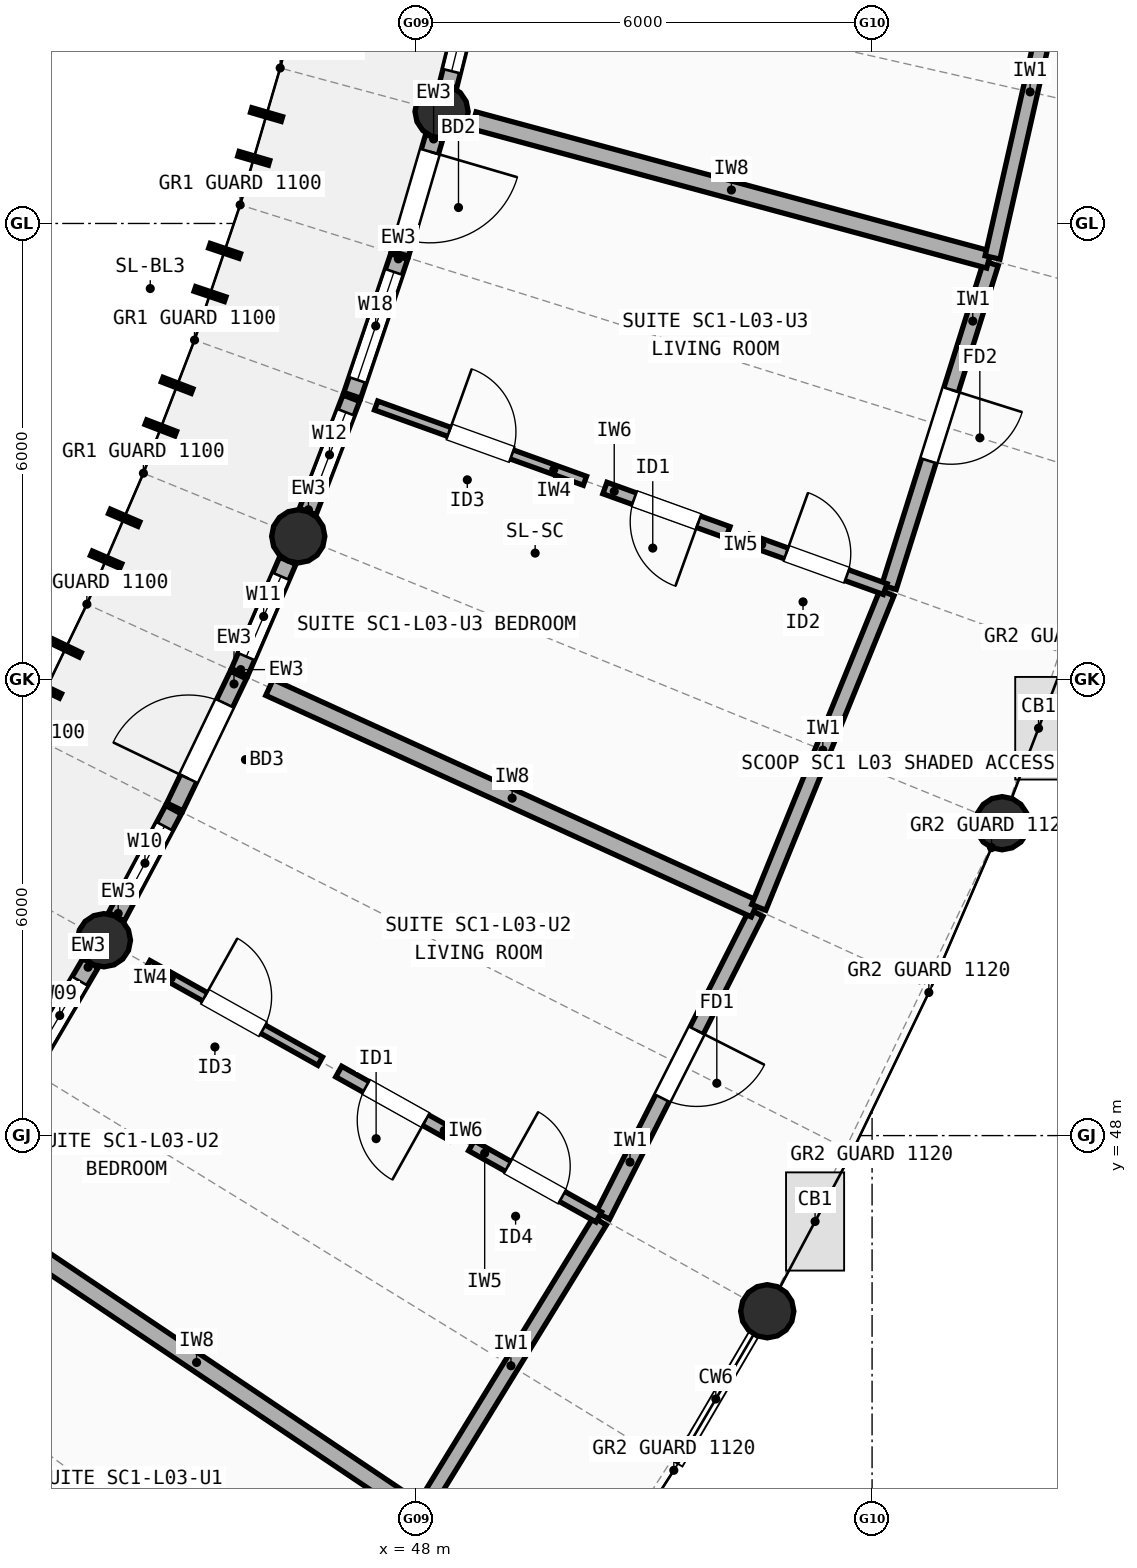
"""IFC4 building model, lengths in metres.
Left out: names, types, materials, properties, quantities, classifications, styles, units other than length and angle.
Written with IfcOpenShell. Run it as: python <this file> out.ifc"""

import sys

from ifc_helpers import new_model, si_unit, direction, frame, frame_2d, origin, origin_2d, place, context, subcontext, project, spatial, rectangle, circle, extrude, element, fill, save


model = new_model("IFC4")
c1 = context("Model", 3, precision=1e-05, world=origin(), true_north=direction((0.0, 1.0)))
c2 = subcontext(c1, "Body", "Model", "MODEL_VIEW")
j1 = project(units=[si_unit("LENGTHUNIT", "METRE"), si_unit("PLANEANGLEUNIT", "RADIAN")], contexts=[c1])
p1 = place(None, origin())
s1 = spatial("IfcSite", under=j1, at=p1, CompositionType="ELEMENT")
p2 = place(p1, origin())
s2 = spatial("IfcBuilding", under=s1, at=p2, CompositionType="ELEMENT")
p3 = place(p2, frame((0.0, 0.0, 10.9)))
s3 = spatial("IfcBuildingStorey", under=s2, at=p3, CompositionType="ELEMENT", Elevation=10.9)
for number, where, z_axis, x_axis in (
    (1, (43.893, 50.57, 0.0), (0.0, 0.0, 1.0), (1.0, 0.0, 0.0)),
    (2, (52.621, 45.689, 0.0), (0.0, 0.0, 1.0), (1.0, 0.0, 0.0)),
    (3, (46.45, 55.884, 0.0), (0.0, 0.0, 1.0), (1.0, 0.0, 0.0)),
    (4, (55.71, 52.11, 0.0), (0.0, 0.0, 1.0), (1.0, 0.0, 0.0)),
    (5, (48.336, 61.471, 0.0), (0.0, 0.0, 1.0), (1.0, 0.0, 0.0)),
):
    element("IfcColumn", number, at=place(p3, frame(where, z_axis=z_axis, x_axis=x_axis)), inside=s3, PredefinedType="COLUMN", context=c2, shape_type="SweptSolid", body=[
        extrude(circle(Radius=0.35, at=origin_2d()), origin(), (0.0, 0.0, 1.0), 2.948),
    ])
p4 = place(p3, frame((42.908, 48.891, 0.0), z_axis=(0.0, 0.0, 1.0), x_axis=(0.505970625323, 0.862550709414, 0.0)))
e6 = element("IfcWall", 6, at=p4, inside=s3, PredefinedType="STANDARD", context=c2, shape_type="SweptSolid", body=[
    extrude(rectangle(XDim=1.597, YDim=0.235, at=frame_2d((0.798, 0.0))), origin(), (0.0, 0.0, 1.0), 2.684),
])
p5 = place(p4, frame((0.273, 0.0, 0.85)))
e7 = element("IfcOpeningElement", 7, at=p5, cuts=e6, PredefinedType="OPENING", context=c2, shape_type="SweptSolid", body=[
    extrude(rectangle(XDim=1.05, YDim=1.35, at=frame_2d((0.525, 0.675))), frame((0.0, 0.127, 0.0), z_axis=(0.0, -1.0, 0.0), x_axis=(1.0, 0.0, 0.0)), (0.0, 0.0, 1.0), 0.255),
])
p6 = place(p3, frame((44.058, 50.879, 0.0), z_axis=(0.0, 0.0, 1.0), x_axis=(0.470183436771, 0.882568714484, 0.0)))
e8 = element("IfcWall", 8, at=p6, inside=s3, PredefinedType="STANDARD", context=c2, shape_type="SweptSolid", body=[
    extrude(rectangle(XDim=1.597, YDim=0.235, at=frame_2d((0.798, 0.0))), origin(), (0.0, 0.0, 1.0), 2.684),
])
p7 = place(p6, frame((0.248, 0.0, 0.85)))
e9 = element("IfcOpeningElement", 9, at=p7, cuts=e8, PredefinedType="OPENING", context=c2, shape_type="SweptSolid", body=[
    extrude(rectangle(XDim=1.1, YDim=1.45, at=frame_2d((0.55, 0.725))), frame((0.0, 0.127, 0.0), z_axis=(0.0, -1.0, 0.0), x_axis=(1.0, 0.0, 0.0)), (0.0, 0.0, 1.0), 0.255),
])
p8 = place(p3, frame((44.826, 52.324, 0.0), z_axis=(0.0, 0.0, 1.0), x_axis=(0.433579410465, 0.90111536155, 0.0)))
e10 = element("IfcWall", 10, at=p8, inside=s3, PredefinedType="STANDARD", context=c2, shape_type="SweptSolid", body=[
    extrude(rectangle(XDim=1.927, YDim=0.235, at=frame_2d((0.963, 0.0))), origin(), (0.0, 0.0, 1.0), 2.684),
])
p9 = place(p8, frame((0.413, 0.0, 0.0)))
e11 = element("IfcOpeningElement", 11, at=p9, cuts=e10, PredefinedType="OPENING", context=c2, shape_type="SweptSolid", body=[
    extrude(rectangle(XDim=1.1, YDim=2.15, at=frame_2d((0.55, 1.075))), frame((0.0, 0.127, 0.0), z_axis=(0.0, -1.0, 0.0), x_axis=(1.0, 0.0, 0.0)), (0.0, 0.0, 1.0), 0.255),
])
p10 = place(p3, frame((45.678, 54.097, 0.0), z_axis=(0.0, 0.0, 1.0), x_axis=(0.396353998836, 0.918097765822, 0.0)))
e12 = element("IfcWall", 12, at=p10, inside=s3, PredefinedType="STANDARD", context=c2, shape_type="SweptSolid", body=[
    extrude(rectangle(XDim=1.597, YDim=0.235, at=frame_2d((0.798, 0.0))), origin(), (0.0, 0.0, 1.0), 2.684),
])
p11 = place(p10, frame((0.223, 0.0, 0.85)))
e13 = element("IfcOpeningElement", 13, at=p11, cuts=e12, PredefinedType="OPENING", context=c2, shape_type="SweptSolid", body=[
    extrude(rectangle(XDim=1.15, YDim=1.45, at=frame_2d((0.575, 0.725))), frame((0.0, 0.127, 0.0), z_axis=(0.0, -1.0, 0.0), x_axis=(1.0, 0.0, 0.0)), (0.0, 0.0, 1.0), 0.255),
])
p12 = place(p3, frame((46.575, 56.211, 0.0), z_axis=(0.0, 0.0, 1.0), x_axis=(0.358384767005, 0.933573970705, 0.0)))
e14 = element("IfcWall", 14, at=p12, inside=s3, PredefinedType="STANDARD", context=c2, shape_type="SweptSolid", body=[
    extrude(rectangle(XDim=1.597, YDim=0.235, at=frame_2d((0.798, 0.0))), origin(), (0.0, 0.0, 1.0), 2.684),
])
p13 = place(p12, frame((0.198, 0.0, 0.85)))
e15 = element("IfcOpeningElement", 15, at=p13, cuts=e14, PredefinedType="OPENING", context=c2, shape_type="SweptSolid", body=[
    extrude(rectangle(XDim=1.2, YDim=1.35, at=frame_2d((0.6, 0.675))), frame((0.0, 0.127, 0.0), z_axis=(0.0, -1.0, 0.0), x_axis=(1.0, 0.0, 0.0)), (0.0, 0.0, 1.0), 0.255),
])
p14 = place(p3, frame((47.161, 57.739, 0.0), z_axis=(0.0, 0.0, 1.0), x_axis=(0.319798549746, 0.947485560618, 0.0)))
e16 = element("IfcWall", 16, at=p14, inside=s3, PredefinedType="STANDARD", context=c2, shape_type="SweptSolid", body=[
    extrude(rectangle(XDim=1.927, YDim=0.235, at=frame_2d((0.963, 0.0))), origin(), (0.0, 0.0, 1.0), 2.684),
])
p15 = place(p14, frame((0.213, 0.0, 0.85)))
e17 = element("IfcOpeningElement", 17, at=p15, cuts=e16, PredefinedType="OPENING", context=c2, shape_type="SweptSolid", body=[
    extrude(rectangle(XDim=1.5, YDim=1.4, at=frame_2d((0.75, 0.7))), frame((0.0, 0.127, 0.0), z_axis=(0.0, -1.0, 0.0), x_axis=(1.0, 0.0, 0.0)), (0.0, 0.0, 1.0), 0.255),
])
p16 = place(p3, frame((47.79, 59.603, 0.0), z_axis=(0.0, 0.0, 1.0), x_axis=(0.28073386291, 0.959785652224, 0.0)))
e18 = element("IfcWall", 18, at=p16, inside=s3, PredefinedType="STANDARD", context=c2, shape_type="SweptSolid", body=[
    extrude(rectangle(XDim=1.597, YDim=0.235, at=frame_2d((0.798, 0.0))), origin(), (0.0, 0.0, 1.0), 2.684),
])
p17 = place(p16, frame((0.198, 0.0, 0.0)))
e19 = element("IfcOpeningElement", 19, at=p17, cuts=e18, PredefinedType="OPENING", context=c2, shape_type="SweptSolid", body=[
    extrude(rectangle(XDim=1.2, YDim=2.15, at=frame_2d((0.6, 1.075))), frame((0.0, 0.127, 0.0), z_axis=(0.0, -1.0, 0.0), x_axis=(1.0, 0.0, 0.0)), (0.0, 0.0, 1.0), 0.255),
])
p18 = place(p3, frame((48.42, 61.811, 0.0), z_axis=(0.0, 0.0, 1.0), x_axis=(0.241240447943, 0.970465376135, 0.0)))
e20 = element("IfcWall", 20, at=p18, inside=s3, PredefinedType="STANDARD", context=c2, shape_type="SweptSolid", body=[
    extrude(rectangle(XDim=1.597, YDim=0.235, at=frame_2d((0.798, 0.0))), origin(), (0.0, 0.0, 1.0), 2.684),
])
p19 = place(p18, frame((0.198, 0.0, 0.85)))
e21 = element("IfcOpeningElement", 21, at=p19, cuts=e20, PredefinedType="OPENING", context=c2, shape_type="SweptSolid", body=[
    extrude(rectangle(XDim=1.2, YDim=1.5, at=frame_2d((0.6, 0.75))), frame((0.0, 0.127, 0.0), z_axis=(0.0, -1.0, 0.0), x_axis=(1.0, 0.0, 0.0)), (0.0, 0.0, 1.0), 0.255),
])
p20 = place(p3, frame((42.2, 46.974, 0.0), z_axis=(0.0, 0.0, 1.0), x_axis=(0.82987699708, -0.55794638606, 0.0)))
e22 = element("IfcWall", 22, at=p20, inside=s3, PredefinedType="SOLIDWALL", context=c2, shape_type="SweptSolid", body=[
    extrude(rectangle(XDim=7.02, YDim=0.23, at=frame_2d((3.51, 0.0))), origin(), (0.0, 0.0, 1.0), 2.722),
])
p21 = place(p3, frame((48.08, 43.069, 0.0), z_axis=(0.0, 0.0, 1.0), x_axis=(0.523444746739, 0.852059620632, 0.0)))
e23 = element("IfcWall", 23, at=p21, inside=s3, PredefinedType="SOLIDWALL", context=c2, shape_type="SweptSolid", body=[
    extrude(rectangle(XDim=4.467, YDim=0.2, at=frame_2d((2.234, 0.0))), origin(), (0.0, 0.0, 1.0), 2.742),
])
p22 = place(p3, frame((50.457, 46.945, 0.0), z_axis=(0.0, 0.0, 1.0), x_axis=(0.451972910967, 0.892031662976, 0.0)))
e24 = element("IfcWall", 24, at=p22, inside=s3, PredefinedType="SOLIDWALL", context=c2, shape_type="SweptSolid", body=[
    extrude(rectangle(XDim=4.467, YDim=0.2, at=frame_2d((2.234, 0.0))), origin(), (0.0, 0.0, 1.0), 2.722),
])
p23 = place(p22, frame((1.734, 0.0, 0.0)))
e25 = element("IfcOpeningElement", 25, at=p23, cuts=e24, PredefinedType="OPENING", context=c2, shape_type="SweptSolid", body=[
    extrude(rectangle(XDim=1.0, YDim=2.15, at=frame_2d((0.5, 1.075))), frame((0.0, 0.11, 0.0), z_axis=(0.0, -1.0, 0.0), x_axis=(1.0, 0.0, 0.0)), (0.0, 0.0, 1.0), 0.22),
])
p24 = place(p3, frame((44.469, 50.248, 0.0), z_axis=(0.0, 0.0, 1.0), x_axis=(0.872794081277, -0.488088610487, 0.0)))
e26 = element("IfcWall", 26, at=p24, inside=s3, PredefinedType="PARTITIONING", context=c2, shape_type="SweptSolid", body=[
    extrude(rectangle(XDim=2.6, YDim=0.125, at=frame_2d((1.3, 0.0))), origin(), (0.0, 0.0, 1.0), 2.762),
])
p25 = place(p24, frame((0.86, 0.0, 0.0)))
e27 = element("IfcOpeningElement", 27, at=p25, cuts=e26, PredefinedType="OPENING", context=c2, shape_type="SweptSolid", body=[
    extrude(rectangle(XDim=0.88, YDim=2.1, at=frame_2d((0.44, 1.05))), frame((0.0, 0.073, 0.0), z_axis=(0.0, -1.0, 0.0), x_axis=(1.0, 0.0, 0.0)), (0.0, 0.0, 1.0), 0.145),
])
p26 = place(p3, frame((46.983, 48.842, 0.0), z_axis=(0.0, 0.0, 1.0), x_axis=(0.872774545553, -0.48812354239, 0.0)))
e28 = element("IfcWall", 28, at=p26, inside=s3, PredefinedType="PLUMBINGWALL", context=c2, shape_type="SweptSolid", body=[
    extrude(rectangle(XDim=1.72, YDim=0.16, at=frame_2d((0.86, 0.0))), origin(), (0.0, 0.0, 1.0), 2.762),
])
p27 = place(p26, frame((0.41, 0.0, 0.0)))
e29 = element("IfcOpeningElement", 29, at=p27, cuts=e28, PredefinedType="OPENING", context=c2, shape_type="SweptSolid", body=[
    extrude(rectangle(XDim=0.9, YDim=2.1, at=frame_2d((0.45, 1.05))), frame((0.0, 0.09, 0.0), z_axis=(0.0, -1.0, 0.0), x_axis=(1.0, 0.0, 0.0)), (0.0, 0.0, 1.0), 0.18),
])
p28 = place(p3, frame((48.728, 47.866, 0.0), z_axis=(0.0, 0.0, 1.0), x_axis=(0.8728224149, -0.488037941198, 0.0)))
e30 = element("IfcWall", 30, at=p28, inside=s3, PredefinedType="PARTITIONING", context=c2, shape_type="SweptSolid", body=[
    extrude(rectangle(XDim=1.92, YDim=0.15, at=frame_2d((0.96, 0.0))), origin(), (0.0, 0.0, 1.0), 2.762),
])
p29 = place(p28, frame((0.55, 0.0, 0.0)))
e31 = element("IfcOpeningElement", 31, at=p29, cuts=e30, PredefinedType="OPENING", context=c2, shape_type="SweptSolid", body=[
    extrude(rectangle(XDim=0.82, YDim=2.08, at=frame_2d((0.41, 1.04))), frame((0.0, 0.085, 0.0), z_axis=(0.0, -1.0, 0.0), x_axis=(1.0, 0.0, 0.0)), (0.0, 0.0, 1.0), 0.17),
])
p30 = place(p3, frame((46.071, 53.896, 0.0), z_axis=(0.0, 0.0, 1.0), x_axis=(0.909807068599, -0.415031442095, 0.0)))
e32 = element("IfcWall", 32, at=p30, inside=s3, PredefinedType="SOLIDWALL", context=c2, shape_type="SweptSolid", body=[
    extrude(rectangle(XDim=7.02, YDim=0.23, at=frame_2d((3.51, 0.0))), origin(), (0.0, 0.0, 1.0), 2.742),
])
p31 = place(p3, frame((52.509, 51.002, 0.0), z_axis=(0.0, 0.0, 1.0), x_axis=(0.377413192487, 0.926044967665, 0.0)))
e33 = element("IfcWall", 33, at=p31, inside=s3, PredefinedType="SOLIDWALL", context=c2, shape_type="SweptSolid", body=[
    extrude(rectangle(XDim=4.467, YDim=0.2, at=frame_2d((2.234, 0.0))), origin(), (0.0, 0.0, 1.0), 2.762),
])
p32 = place(p3, frame((54.222, 55.215, 0.0), z_axis=(0.0, 0.0, 1.0), x_axis=(0.300377958446, 0.953820256694, 0.0)))
e34 = element("IfcWall", 34, at=p32, inside=s3, PredefinedType="SOLIDWALL", context=c2, shape_type="SweptSolid", body=[
    extrude(rectangle(XDim=4.467, YDim=0.2, at=frame_2d((2.233, 0.0))), origin(), (0.0, 0.0, 1.0), 2.742),
])
p33 = place(p32, frame((1.743, 0.0, 0.0)))
e35 = element("IfcOpeningElement", 35, at=p33, cuts=e34, PredefinedType="OPENING", context=c2, shape_type="SweptSolid", body=[
    extrude(rectangle(XDim=0.98, YDim=2.15, at=frame_2d((0.49, 1.075))), frame((0.0, 0.11, 0.0), z_axis=(0.0, -1.0, 0.0), x_axis=(1.0, 0.0, 0.0)), (0.0, 0.0, 1.0), 0.22),
])
p34 = place(p3, frame((47.475, 57.605, 0.0), z_axis=(0.0, 0.0, 1.0), x_axis=(0.940746643475, -0.33911023693, 0.0)))
e36 = element("IfcWall", 36, at=p34, inside=s3, PredefinedType="PARTITIONING", context=c2, shape_type="SweptSolid", body=[
    extrude(rectangle(XDim=2.92, YDim=0.125, at=frame_2d((1.46, 0.0))), origin(), (0.0, 0.0, 1.0), 2.722),
])
p35 = place(p34, frame((1.02, 0.0, 0.0)))
e37 = element("IfcOpeningElement", 37, at=p35, cuts=e36, PredefinedType="OPENING", context=c2, shape_type="SweptSolid", body=[
    extrude(rectangle(XDim=0.88, YDim=2.1, at=frame_2d((0.44, 1.05))), frame((0.0, 0.073, 0.0), z_axis=(0.0, -1.0, 0.0), x_axis=(1.0, 0.0, 0.0)), (0.0, 0.0, 1.0), 0.145),
])
p36 = place(p3, frame((50.485, 56.519, 0.0), z_axis=(0.0, 0.0, 1.0), x_axis=(0.940738931862, -0.339131629428, 0.0)))
e38 = element("IfcWall", 38, at=p36, inside=s3, PredefinedType="PLUMBINGWALL", context=c2, shape_type="SweptSolid", body=[
    extrude(rectangle(XDim=1.72, YDim=0.16, at=frame_2d((0.86, 0.0))), origin(), (0.0, 0.0, 1.0), 2.722),
])
p37 = place(p36, frame((0.41, 0.0, 0.0)))
e39 = element("IfcOpeningElement", 39, at=p37, cuts=e38, PredefinedType="OPENING", context=c2, shape_type="SweptSolid", body=[
    extrude(rectangle(XDim=0.9, YDim=2.1, at=frame_2d((0.45, 1.05))), frame((0.0, 0.09, 0.0), z_axis=(0.0, -1.0, 0.0), x_axis=(1.0, 0.0, 0.0)), (0.0, 0.0, 1.0), 0.18),
])
p38 = place(p3, frame((52.366, 55.841, 0.0), z_axis=(0.0, 0.0, 1.0), x_axis=(0.94073656273, -0.339138201244, 0.0)))
e40 = element("IfcWall", 40, at=p38, inside=s3, PredefinedType="PARTITIONING", context=c2, shape_type="SweptSolid", body=[
    extrude(rectangle(XDim=1.92, YDim=0.15, at=frame_2d((0.96, 0.0))), origin(), (0.0, 0.0, 1.0), 2.722),
])
p39 = place(p38, frame((0.535, 0.0, 0.0)))
e41 = element("IfcOpeningElement", 41, at=p39, cuts=e40, PredefinedType="OPENING", context=c2, shape_type="SweptSolid", body=[
    extrude(rectangle(XDim=0.85, YDim=2.1, at=frame_2d((0.425, 1.05))), frame((0.0, 0.085, 0.0), z_axis=(0.0, -1.0, 0.0), x_axis=(1.0, 0.0, 0.0)), (0.0, 0.0, 1.0), 0.17),
])
p40 = place(p3, frame((48.761, 61.356, 0.0), z_axis=(0.0, 0.0, 1.0), x_axis=(0.965329768393, -0.26103340448, 0.0)))
e42 = element("IfcWall", 42, at=p40, inside=s3, PredefinedType="SOLIDWALL", context=c2, shape_type="SweptSolid", body=[
    extrude(rectangle(XDim=7.02, YDim=0.23, at=frame_2d((3.51, 0.0))), origin(), (0.0, 0.0, 1.0), 2.762),
])
p41 = place(p3, frame((55.585, 59.552, 0.0), z_axis=(0.0, 0.0, 1.0), x_axis=(0.221221895428, 0.97522349899, 0.0)))
e43 = element("IfcWall", 43, at=p41, inside=s3, PredefinedType="SOLIDWALL", context=c2, shape_type="SweptSolid", body=[
    extrude(rectangle(XDim=4.467, YDim=0.2, at=frame_2d((2.234, 0.0))), origin(), (0.0, 0.0, 1.0), 2.722),
])
p42 = place(p5, origin())
e44 = element("IfcWindow", 44, at=p42, inside=s3, PartitioningType="SINGLE_PANEL", PredefinedType="WINDOW", context=c2, shape_type="SweptSolid", body=[
    extrude(rectangle(XDim=1.05, YDim=1.35, at=frame_2d((0.525, 0.675))), frame((0.0, 0.03, 0.0), z_axis=(0.0, -1.0, 0.0), x_axis=(1.0, 0.0, 0.0)), (0.0, 0.0, 1.0), 0.06),
])
fill(e7, e44)
p43 = place(p7, origin())
e45 = element("IfcWindow", 45, at=p43, inside=s3, PartitioningType="SINGLE_PANEL", PredefinedType="WINDOW", context=c2, shape_type="SweptSolid", body=[
    extrude(rectangle(XDim=1.1, YDim=1.45, at=frame_2d((0.55, 0.725))), frame((0.0, 0.03, 0.0), z_axis=(0.0, -1.0, 0.0), x_axis=(1.0, 0.0, 0.0)), (0.0, 0.0, 1.0), 0.06),
])
fill(e9, e45)
p44 = place(p9, origin())
e46 = element("IfcDoor", 46, at=p44, inside=s3, OperationType="SINGLE_SWING_LEFT", PredefinedType="DOOR", context=c2, shape_type="SweptSolid", body=[
    extrude(rectangle(XDim=1.1, YDim=2.15, at=frame_2d((0.55, 1.075))), frame((0.0, 0.025, 0.0), z_axis=(0.0, -1.0, 0.0), x_axis=(1.0, 0.0, 0.0)), (0.0, 0.0, 1.0), 0.05),
])
fill(e11, e46)
p45 = place(p11, origin())
e47 = element("IfcWindow", 47, at=p45, inside=s3, PartitioningType="SINGLE_PANEL", PredefinedType="WINDOW", context=c2, shape_type="SweptSolid", body=[
    extrude(rectangle(XDim=1.15, YDim=1.45, at=frame_2d((0.575, 0.725))), frame((0.0, 0.03, 0.0), z_axis=(0.0, -1.0, 0.0), x_axis=(1.0, 0.0, 0.0)), (0.0, 0.0, 1.0), 0.06),
])
fill(e13, e47)
p46 = place(p13, origin())
e48 = element("IfcWindow", 48, at=p46, inside=s3, PartitioningType="SINGLE_PANEL", PredefinedType="WINDOW", context=c2, shape_type="SweptSolid", body=[
    extrude(rectangle(XDim=1.2, YDim=1.35, at=frame_2d((0.6, 0.675))), frame((0.0, 0.03, 0.0), z_axis=(0.0, -1.0, 0.0), x_axis=(1.0, 0.0, 0.0)), (0.0, 0.0, 1.0), 0.06),
])
fill(e15, e48)
p47 = place(p15, origin())
e49 = element("IfcWindow", 49, at=p47, inside=s3, PartitioningType="SINGLE_PANEL", PredefinedType="WINDOW", context=c2, shape_type="SweptSolid", body=[
    extrude(rectangle(XDim=1.5, YDim=1.4, at=frame_2d((0.75, 0.7))), frame((0.0, 0.03, 0.0), z_axis=(0.0, -1.0, 0.0), x_axis=(1.0, 0.0, 0.0)), (0.0, 0.0, 1.0), 0.06),
])
fill(e17, e49)
p48 = place(p17, origin())
e50 = element("IfcDoor", 50, at=p48, inside=s3, OperationType="SINGLE_SWING_RIGHT", PredefinedType="DOOR", context=c2, shape_type="SweptSolid", body=[
    extrude(rectangle(XDim=1.2, YDim=2.15, at=frame_2d((0.6, 1.075))), frame((0.0, 0.025, 0.0), z_axis=(0.0, -1.0, 0.0), x_axis=(1.0, 0.0, 0.0)), (0.0, 0.0, 1.0), 0.05),
])
fill(e19, e50)
p49 = place(p19, origin())
e51 = element("IfcWindow", 51, at=p49, inside=s3, PartitioningType="SINGLE_PANEL", PredefinedType="WINDOW", context=c2, shape_type="SweptSolid", body=[
    extrude(rectangle(XDim=1.2, YDim=1.5, at=frame_2d((0.6, 0.75))), frame((0.0, 0.03, 0.0), z_axis=(0.0, -1.0, 0.0), x_axis=(1.0, 0.0, 0.0)), (0.0, 0.0, 1.0), 0.06),
])
fill(e21, e51)
p50 = place(p23, origin())
e52 = element("IfcDoor", 52, at=p50, inside=s3, OperationType="SINGLE_SWING_RIGHT", PredefinedType="DOOR", context=c2, shape_type="SweptSolid", body=[
    extrude(rectangle(XDim=1.0, YDim=2.15, at=frame_2d((0.5, 1.075))), frame((0.0, 0.025, 0.0), z_axis=(0.0, -1.0, 0.0), x_axis=(1.0, 0.0, 0.0)), (0.0, 0.0, 1.0), 0.05),
])
fill(e25, e52)
p51 = place(p25, origin())
e53 = element("IfcDoor", 53, at=p51, inside=s3, OperationType="SINGLE_SWING_LEFT", PredefinedType="DOOR", context=c2, shape_type="SweptSolid", body=[
    extrude(rectangle(XDim=0.88, YDim=2.1, at=frame_2d((0.44, 1.05))), frame((0.0, 0.025, 0.0), z_axis=(0.0, -1.0, 0.0), x_axis=(1.0, 0.0, 0.0)), (0.0, 0.0, 1.0), 0.05),
])
fill(e27, e53)
p52 = place(p27, origin())
e54 = element("IfcDoor", 54, at=p52, inside=s3, OperationType="SINGLE_SWING_RIGHT", PredefinedType="DOOR", context=c2, shape_type="SweptSolid", body=[
    extrude(rectangle(XDim=0.9, YDim=2.1, at=frame_2d((0.45, 1.05))), frame((0.0, 0.025, 0.0), z_axis=(0.0, -1.0, 0.0), x_axis=(1.0, 0.0, 0.0)), (0.0, 0.0, 1.0), 0.05),
])
fill(e29, e54)
p53 = place(p29, origin())
e55 = element("IfcDoor", 55, at=p53, inside=s3, OperationType="SINGLE_SWING_LEFT", PredefinedType="DOOR", context=c2, shape_type="SweptSolid", body=[
    extrude(rectangle(XDim=0.82, YDim=2.08, at=frame_2d((0.41, 1.04))), frame((0.0, 0.025, 0.0), z_axis=(0.0, -1.0, 0.0), x_axis=(1.0, 0.0, 0.0)), (0.0, 0.0, 1.0), 0.05),
])
fill(e31, e55)
p54 = place(p33, origin())
e56 = element("IfcDoor", 56, at=p54, inside=s3, OperationType="SINGLE_SWING_RIGHT", PredefinedType="DOOR", context=c2, shape_type="SweptSolid", body=[
    extrude(rectangle(XDim=0.98, YDim=2.15, at=frame_2d((0.49, 1.075))), frame((0.0, 0.025, 0.0), z_axis=(0.0, -1.0, 0.0), x_axis=(1.0, 0.0, 0.0)), (0.0, 0.0, 1.0), 0.05),
])
fill(e35, e56)
p55 = place(p35, origin())
e57 = element("IfcDoor", 57, at=p55, inside=s3, OperationType="SINGLE_SWING_LEFT", PredefinedType="DOOR", context=c2, shape_type="SweptSolid", body=[
    extrude(rectangle(XDim=0.88, YDim=2.1, at=frame_2d((0.44, 1.05))), frame((0.0, 0.025, 0.0), z_axis=(0.0, -1.0, 0.0), x_axis=(1.0, 0.0, 0.0)), (0.0, 0.0, 1.0), 0.05),
])
fill(e37, e57)
p56 = place(p37, origin())
e58 = element("IfcDoor", 58, at=p56, inside=s3, OperationType="SINGLE_SWING_RIGHT", PredefinedType="DOOR", context=c2, shape_type="SweptSolid", body=[
    extrude(rectangle(XDim=0.9, YDim=2.1, at=frame_2d((0.45, 1.05))), frame((0.0, 0.025, 0.0), z_axis=(0.0, -1.0, 0.0), x_axis=(1.0, 0.0, 0.0)), (0.0, 0.0, 1.0), 0.05),
])
fill(e39, e58)
p57 = place(p39, origin())
e59 = element("IfcDoor", 59, at=p57, inside=s3, OperationType="SINGLE_SWING_LEFT", PredefinedType="DOOR", context=c2, shape_type="SweptSolid", body=[
    extrude(rectangle(XDim=0.85, YDim=2.1, at=frame_2d((0.425, 1.05))), frame((0.0, 0.025, 0.0), z_axis=(0.0, -1.0, 0.0), x_axis=(1.0, 0.0, 0.0)), (0.0, 0.0, 1.0), 0.05),
])
fill(e41, e59)
save(model, sys.argv[1])
